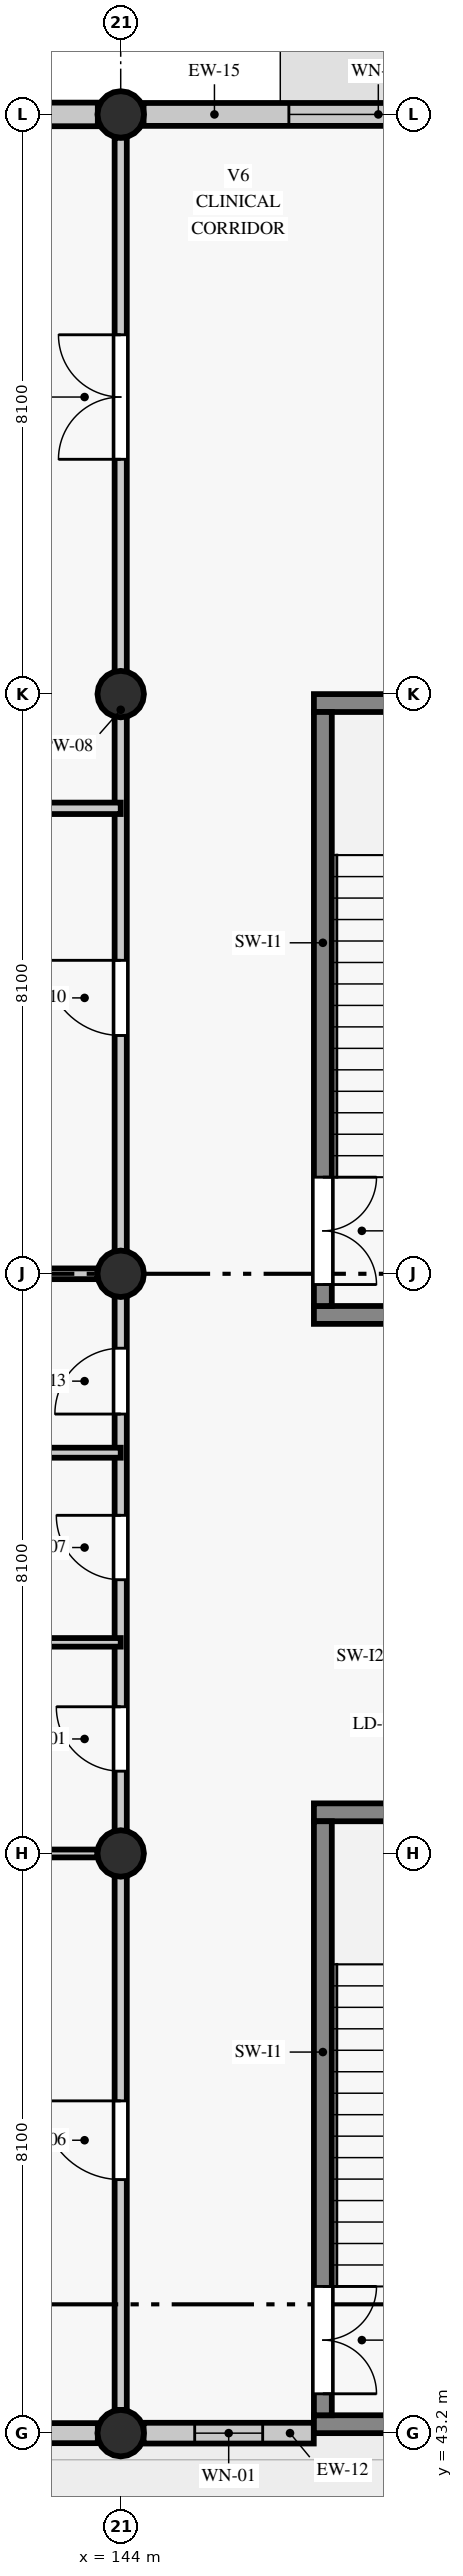
"""IFC4 building model, lengths in metres.
Left out: names, types, materials, properties, quantities, classifications, styles, units other than length and angle.
Written with IfcOpenShell. Run it as: python <this file> out.ifc"""

import sys

from ifc_helpers import new_model, si_unit, direction, frame, frame_2d, origin, origin_2d, place, context, subcontext, project, spatial, rectangle, circle, extrude, element, fill, save


model = new_model("IFC4")
c1 = context("Model", 3, precision=1e-05, world=origin(), true_north=direction((0.0, 1.0)))
c2 = subcontext(c1, "Body", "Model", "MODEL_VIEW")
j1 = project(units=[si_unit("LENGTHUNIT", "METRE"), si_unit("PLANEANGLEUNIT", "RADIAN")], contexts=[c1])
p1 = place(None, origin())
s1 = spatial("IfcSite", under=j1, at=p1, CompositionType="ELEMENT")
p2 = place(p1, origin())
s2 = spatial("IfcBuilding", under=s1, at=p2, CompositionType="ELEMENT")
p3 = place(p2, frame((0.0, 0.0, 4.8)))
s3 = spatial("IfcBuildingStorey", under=s2, at=p3, CompositionType="ELEMENT", Elevation=4.8)
for number, where, z_axis, x_axis in (
    (1, (144.0, 43.2, 0.0), (0.0, 0.0, 1.0), (1.0, 0.0, 0.0)),
    (2, (144.0, 51.3, 0.0), (0.0, 0.0, 1.0), (1.0, 0.0, 0.0)),
    (3, (144.0, 59.4, 0.0), (0.0, 0.0, 1.0), (1.0, 0.0, 0.0)),
):
    element("IfcColumn", number, at=place(p3, frame(where, z_axis=z_axis, x_axis=x_axis)), inside=s3, PredefinedType="COLUMN", context=c2, shape_type="SweptSolid", body=[
        extrude(circle(Radius=0.325, at=origin_2d()), origin(), (0.0, 0.0, 1.0), 4.56),
    ])
for number, where, z_axis, x_axis in (
    (4, (144.0, 67.5, 0.0), (0.0, 0.0, 1.0), (1.0, 0.0, 0.0)),
    (5, (144.0, 75.6, 0.0), (0.0, 0.0, 1.0), (1.0, 0.0, 0.0)),
):
    element("IfcColumn", number, at=place(p3, frame(where, z_axis=z_axis, x_axis=x_axis)), inside=s3, PredefinedType="COLUMN", context=c2, shape_type="SweptSolid", body=[
        extrude(circle(Radius=0.325, at=origin_2d()), origin(), (0.0, 0.0, 1.0), 4.518),
    ])
p4 = place(p3, frame((137.12, 43.2, 0.0), z_axis=(0.0, 0.0, 1.0), x_axis=(1.0, 0.0, 0.0)))
e6 = element("IfcWall", 6, at=p4, inside=s3, PredefinedType="STANDARD", context=c2, shape_type="SweptSolid", body=[
    extrude(rectangle(XDim=6.56, YDim=0.28, at=frame_2d((3.28, 0.0))), origin(), (0.0, 0.0, 1.0), 3.91),
])
p5 = place(p4, frame((2.76, 0.0, 0.0)))
e7 = element("IfcOpeningElement", 7, at=p5, cuts=e6, PredefinedType="OPENING", context=c2, shape_type="SweptSolid", body=[
    extrude(rectangle(XDim=1.04, YDim=2.1, at=frame_2d((0.52, 1.05))), frame((0.0, 0.15, 0.0), z_axis=(0.0, -1.0, 0.0), x_axis=(1.0, 0.0, 0.0)), (0.0, 0.0, 1.0), 0.3),
])
p6 = place(p3, frame((144.32, 43.2, 0.0), z_axis=(0.0, 0.0, 1.0), x_axis=(1.0, 0.0, 0.0)))
e8 = element("IfcWall", 8, at=p6, inside=s3, PredefinedType="STANDARD", context=c2, shape_type="SweptSolid", body=[
    extrude(rectangle(XDim=2.378, YDim=0.29, at=frame_2d((1.189, 0.0))), origin(), (0.0, 0.0, 1.0), 4.56),
])
p7 = place(p6, frame((0.714, 0.0, 0.9)))
e9 = element("IfcOpeningElement", 9, at=p7, cuts=e8, PredefinedType="OPENING", context=c2, shape_type="SweptSolid", body=[
    extrude(rectangle(XDim=0.95, YDim=1.3, at=frame_2d((0.475, 0.65))), frame((0.0, 0.155, 0.0), z_axis=(0.0, -1.0, 0.0), x_axis=(1.0, 0.0, 0.0)), (0.0, 0.0, 1.0), 0.31),
])
p8 = place(p3, frame((150.88, 75.6, 0.0), z_axis=(0.0, 0.0, 1.0), x_axis=(-1.0, 0.0, 0.0)))
e10 = element("IfcWall", 10, at=p8, inside=s3, PredefinedType="STANDARD", context=c2, shape_type="SweptSolid", body=[
    extrude(rectangle(XDim=6.56, YDim=0.32, at=frame_2d((3.28, 0.0))), origin(), (0.0, 0.0, 1.0), 3.868),
])
p9 = place(p8, frame((2.03, 0.0, 0.9)))
e11 = element("IfcOpeningElement", 11, at=p9, cuts=e10, PredefinedType="OPENING", context=c2, shape_type="SweptSolid", body=[
    extrude(rectangle(XDim=2.5, YDim=1.66, at=frame_2d((1.25, 0.83))), frame((0.0, 0.17, 0.0), z_axis=(0.0, -1.0, 0.0), x_axis=(1.0, 0.0, 0.0)), (0.0, 0.0, 1.0), 0.34),
])
p10 = place(p3, frame((143.68, 75.6, 0.0), z_axis=(0.0, 0.0, 1.0), x_axis=(-1.0, 0.0, 0.0)))
e12 = element("IfcWall", 12, at=p10, inside=s3, PredefinedType="STANDARD", context=c2, shape_type="SweptSolid", body=[
    extrude(rectangle(XDim=6.56, YDim=0.33, at=frame_2d((3.28, 0.0))), origin(), (0.0, 0.0, 1.0), 3.868),
])
p11 = place(p10, frame((2.605, 0.0, 0.9)))
e13 = element("IfcOpeningElement", 13, at=p11, cuts=e12, PredefinedType="OPENING", context=c2, shape_type="SweptSolid", body=[
    extrude(rectangle(XDim=1.35, YDim=1.78, at=frame_2d((0.675, 0.89))), frame((0.0, 0.175, 0.0), z_axis=(0.0, -1.0, 0.0), x_axis=(1.0, 0.0, 0.0)), (0.0, 0.0, 1.0), 0.35),
])
for number, where, z_axis, x_axis in (
    (14, (146.7, 43.325, 0.0), (0.0, 0.0, 1.0), (1.0, 0.0, 0.0)),
    (15, (151.2, 51.875, 0.0), (0.0, 0.0, 1.0), (-1.0, 0.0, 0.0)),
):
    element("IfcWall", number, at=place(p3, frame(where, z_axis=z_axis, x_axis=x_axis)), inside=s3, PredefinedType="SHEAR", context=c2, shape_type="SweptSolid", body=[
        extrude(rectangle(XDim=4.5, YDim=0.25, at=frame_2d((2.25, 0.0))), origin(), (0.0, 0.0, 1.0), 4.56),
    ])
p12 = place(p3, frame((146.825, 51.75, 0.0), z_axis=(0.0, 0.0, 1.0), x_axis=(0.0, -1.0, 0.0)))
e16 = element("IfcWall", 16, at=p12, inside=s3, PredefinedType="SHEAR", context=c2, shape_type="SweptSolid", body=[
    extrude(rectangle(XDim=8.3, YDim=0.25, at=frame_2d((4.15, 0.0))), origin(), (0.0, 0.0, 1.0), 4.56),
])
p13 = place(p12, frame((6.5, 0.0, 0.0)))
e17 = element("IfcOpeningElement", 17, at=p13, cuts=e16, PredefinedType="OPENING", context=c2, shape_type="SweptSolid", body=[
    extrude(rectangle(XDim=1.5, YDim=2.15, at=frame_2d((0.75, 1.075))), frame((0.0, 0.135, 0.0), z_axis=(0.0, -1.0, 0.0), x_axis=(1.0, 0.0, 0.0)), (0.0, 0.0, 1.0), 0.27),
])
for number, where, z_axis, x_axis in (
    (18, (146.7, 58.825, 0.0), (0.0, 0.0, 1.0), (1.0, 0.0, 0.0)),
    (19, (151.2, 67.375, 0.0), (0.0, 0.0, 1.0), (-1.0, 0.0, 0.0)),
):
    element("IfcWall", number, at=place(p3, frame(where, z_axis=z_axis, x_axis=x_axis)), inside=s3, PredefinedType="SHEAR", context=c2, shape_type="SweptSolid", body=[
        extrude(rectangle(XDim=4.5, YDim=0.25, at=frame_2d((2.25, 0.0))), origin(), (0.0, 0.0, 1.0), 4.56),
    ])
p14 = place(p3, frame((146.825, 67.25, 0.0), z_axis=(0.0, 0.0, 1.0), x_axis=(0.0, -1.0, 0.0)))
e20 = element("IfcWall", 20, at=p14, inside=s3, PredefinedType="SHEAR", context=c2, shape_type="SweptSolid", body=[
    extrude(rectangle(XDim=8.3, YDim=0.25, at=frame_2d((4.15, 0.0))), origin(), (0.0, 0.0, 1.0), 4.56),
])
p15 = place(p14, frame((6.5, 0.0, 0.0)))
e21 = element("IfcOpeningElement", 21, at=p15, cuts=e20, PredefinedType="OPENING", context=c2, shape_type="SweptSolid", body=[
    extrude(rectangle(XDim=1.5, YDim=2.15, at=frame_2d((0.75, 1.075))), frame((0.0, 0.135, 0.0), z_axis=(0.0, -1.0, 0.0), x_axis=(1.0, 0.0, 0.0)), (0.0, 0.0, 1.0), 0.27),
])
p16 = place(p3, frame((144.0, 43.525, 0.0), z_axis=(0.0, 0.0, 1.0), x_axis=(0.0, 1.0, 0.0)))
e22 = element("IfcWall", 22, at=p16, inside=s3, PredefinedType="PARTITIONING", context=c2, shape_type="SweptSolid", body=[
    extrude(rectangle(XDim=31.75, YDim=0.17, at=frame_2d((15.875, 0.0))), origin(), (0.0, 0.0, 1.0), 4.068),
])
p17 = place(p16, frame((3.218, 0.0, 0.0)))
e23 = element("IfcOpeningElement", 23, at=p17, cuts=e22, PredefinedType="OPENING", context=c2, shape_type="SweptSolid", body=[
    extrude(rectangle(XDim=1.1, YDim=2.08, at=frame_2d((0.55, 1.04))), frame((0.0, 0.095, 0.0), z_axis=(0.0, -1.0, 0.0), x_axis=(1.0, 0.0, 0.0)), (0.0, 0.0, 1.0), 0.19),
])
p18 = place(p16, frame((8.925, 0.0, 0.0)))
e24 = element("IfcOpeningElement", 24, at=p18, cuts=e22, PredefinedType="OPENING", context=c2, shape_type="SweptSolid", body=[
    extrude(rectangle(XDim=0.9, YDim=2.08, at=frame_2d((0.45, 1.04))), frame((0.0, 0.095, 0.0), z_axis=(0.0, -1.0, 0.0), x_axis=(1.0, 0.0, 0.0)), (0.0, 0.0, 1.0), 0.19),
])
p19 = place(p16, frame((11.6, 0.0, 0.0)))
e25 = element("IfcOpeningElement", 25, at=p19, cuts=e22, PredefinedType="OPENING", context=c2, shape_type="SweptSolid", body=[
    extrude(rectangle(XDim=0.9, YDim=2.13, at=frame_2d((0.45, 1.065))), frame((0.0, 0.095, 0.0), z_axis=(0.0, -1.0, 0.0), x_axis=(1.0, 0.0, 0.0)), (0.0, 0.0, 1.0), 0.19),
])
p20 = place(p16, frame((13.915, 0.0, 0.0)))
e26 = element("IfcOpeningElement", 26, at=p20, cuts=e22, PredefinedType="OPENING", context=c2, shape_type="SweptSolid", body=[
    extrude(rectangle(XDim=0.92, YDim=2.18, at=frame_2d((0.46, 1.09))), frame((0.0, 0.095, 0.0), z_axis=(0.0, -1.0, 0.0), x_axis=(1.0, 0.0, 0.0)), (0.0, 0.0, 1.0), 0.19),
])
p21 = place(p16, frame((19.205, 0.0, 0.0)))
e27 = element("IfcOpeningElement", 27, at=p21, cuts=e22, PredefinedType="OPENING", context=c2, shape_type="SweptSolid", body=[
    extrude(rectangle(XDim=1.05, YDim=2.13, at=frame_2d((0.525, 1.065))), frame((0.0, 0.095, 0.0), z_axis=(0.0, -1.0, 0.0), x_axis=(1.0, 0.0, 0.0)), (0.0, 0.0, 1.0), 0.19),
])
p22 = place(p16, frame((27.256, 0.0, 0.0)))
e28 = element("IfcOpeningElement", 28, at=p22, cuts=e22, PredefinedType="OPENING", context=c2, shape_type="SweptSolid", body=[
    extrude(rectangle(XDim=1.74, YDim=2.26, at=frame_2d((0.87, 1.13))), frame((0.0, 0.095, 0.0), z_axis=(0.0, -1.0, 0.0), x_axis=(1.0, 0.0, 0.0)), (0.0, 0.0, 1.0), 0.19),
])
p23 = place(p3, frame((137.125, 51.3, 0.0), z_axis=(0.0, 0.0, 1.0), x_axis=(1.0, 0.0, 0.0)))
e29 = element("IfcWall", 29, at=p23, inside=s3, PredefinedType="PARTITIONING", context=c2, shape_type="SweptSolid", body=[
    extrude(rectangle(XDim=6.55, YDim=0.11, at=frame_2d((3.275, 0.0))), origin(), (0.0, 0.0, 1.0), 3.86),
])
p24 = place(p3, frame((140.65, 54.25, 0.0), z_axis=(0.0, 0.0, 1.0), x_axis=(1.0, 0.0, 0.0)))
e30 = element("IfcWall", 30, at=p24, inside=s3, PredefinedType="PARTITIONING", context=c2, shape_type="SweptSolid", body=[
    extrude(rectangle(XDim=3.35, YDim=0.12, at=frame_2d((1.675, 0.0))), origin(), (0.0, 0.0, 1.0), 4.56),
])
p25 = place(p3, frame((136.922, 56.9, 0.0), z_axis=(0.0, 0.0, 1.0), x_axis=(1.0, 0.0, 0.0)))
e31 = element("IfcWall", 31, at=p25, inside=s3, PredefinedType="PARTITIONING", context=c2, shape_type="SweptSolid", body=[
    extrude(rectangle(XDim=7.078, YDim=0.14, at=frame_2d((3.539, 0.0))), origin(), (0.0, 0.0, 1.0), 4.56),
])
p26 = place(p3, frame((137.125, 59.4, 0.0), z_axis=(0.0, 0.0, 1.0), x_axis=(1.0, 0.0, 0.0)))
e32 = element("IfcWall", 32, at=p26, inside=s3, PredefinedType="PARTITIONING", context=c2, shape_type="SweptSolid", body=[
    extrude(rectangle(XDim=6.55, YDim=0.15, at=frame_2d((3.275, 0.0))), origin(), (0.0, 0.0, 1.0), 3.86),
])
p27 = place(p3, frame((136.917, 65.904, 0.0), z_axis=(0.0, 0.0, 1.0), x_axis=(1.0, 0.0, 0.0)))
e33 = element("IfcWall", 33, at=p27, inside=s3, PredefinedType="PARTITIONING", context=c2, shape_type="SweptSolid", body=[
    extrude(rectangle(XDim=7.083, YDim=0.16, at=frame_2d((3.542, 0.0))), origin(), (0.0, 0.0, 1.0), 4.11),
])
p28 = place(p7, origin())
e34 = element("IfcWindow", 34, at=p28, inside=s3, PartitioningType="SINGLE_PANEL", PredefinedType="WINDOW", context=c2, shape_type="SweptSolid", body=[
    extrude(rectangle(XDim=0.95, YDim=1.3, at=frame_2d((0.475, 0.65))), frame((0.0, 0.03, 0.0), z_axis=(0.0, -1.0, 0.0), x_axis=(1.0, 0.0, 0.0)), (0.0, 0.0, 1.0), 0.06),
])
fill(e9, e34)
p29 = place(p9, origin())
e35 = element("IfcWindow", 35, at=p29, inside=s3, PartitioningType="SINGLE_PANEL", PredefinedType="WINDOW", context=c2, shape_type="SweptSolid", body=[
    extrude(rectangle(XDim=2.5, YDim=1.66, at=frame_2d((1.25, 0.83))), frame((0.0, 0.03, 0.0), z_axis=(0.0, -1.0, 0.0), x_axis=(1.0, 0.0, 0.0)), (0.0, 0.0, 1.0), 0.06),
])
fill(e11, e35)
p30 = place(p13, origin())
e36 = element("IfcDoor", 36, at=p30, inside=s3, OperationType="DOUBLE_DOOR_SINGLE_SWING", PredefinedType="DOOR", context=c2, shape_type="SweptSolid", body=[
    extrude(rectangle(XDim=1.5, YDim=2.15, at=frame_2d((0.75, 1.075))), frame((0.0, 0.025, 0.0), z_axis=(0.0, -1.0, 0.0), x_axis=(1.0, 0.0, 0.0)), (0.0, 0.0, 1.0), 0.05),
])
fill(e17, e36)
p31 = place(p15, origin())
e37 = element("IfcDoor", 37, at=p31, inside=s3, OperationType="DOUBLE_DOOR_SINGLE_SWING", PredefinedType="DOOR", context=c2, shape_type="SweptSolid", body=[
    extrude(rectangle(XDim=1.5, YDim=2.15, at=frame_2d((0.75, 1.075))), frame((0.0, 0.025, 0.0), z_axis=(0.0, -1.0, 0.0), x_axis=(1.0, 0.0, 0.0)), (0.0, 0.0, 1.0), 0.05),
])
fill(e21, e37)
p32 = place(p17, origin())
e38 = element("IfcDoor", 38, at=p32, inside=s3, OperationType="SINGLE_SWING_RIGHT", PredefinedType="DOOR", context=c2, shape_type="SweptSolid", body=[
    extrude(rectangle(XDim=1.1, YDim=2.08, at=frame_2d((0.55, 1.04))), frame((0.0, 0.025, 0.0), z_axis=(0.0, -1.0, 0.0), x_axis=(1.0, 0.0, 0.0)), (0.0, 0.0, 1.0), 0.05),
])
fill(e23, e38)
p33 = place(p18, origin())
e39 = element("IfcDoor", 39, at=p33, inside=s3, OperationType="SINGLE_SWING_RIGHT", PredefinedType="DOOR", context=c2, shape_type="SweptSolid", body=[
    extrude(rectangle(XDim=0.9, YDim=2.08, at=frame_2d((0.45, 1.04))), frame((0.0, 0.025, 0.0), z_axis=(0.0, -1.0, 0.0), x_axis=(1.0, 0.0, 0.0)), (0.0, 0.0, 1.0), 0.05),
])
fill(e24, e39)
p34 = place(p19, origin())
e40 = element("IfcDoor", 40, at=p34, inside=s3, OperationType="SINGLE_SWING_RIGHT", PredefinedType="DOOR", context=c2, shape_type="SweptSolid", body=[
    extrude(rectangle(XDim=0.9, YDim=2.13, at=frame_2d((0.45, 1.065))), frame((0.0, 0.025, 0.0), z_axis=(0.0, -1.0, 0.0), x_axis=(1.0, 0.0, 0.0)), (0.0, 0.0, 1.0), 0.05),
])
fill(e25, e40)
p35 = place(p20, origin())
e41 = element("IfcDoor", 41, at=p35, inside=s3, OperationType="SINGLE_SWING_LEFT", PredefinedType="DOOR", context=c2, shape_type="SweptSolid", body=[
    extrude(rectangle(XDim=0.92, YDim=2.18, at=frame_2d((0.46, 1.09))), frame((0.0, 0.025, 0.0), z_axis=(0.0, -1.0, 0.0), x_axis=(1.0, 0.0, 0.0)), (0.0, 0.0, 1.0), 0.05),
])
fill(e26, e41)
p36 = place(p21, origin())
e42 = element("IfcDoor", 42, at=p36, inside=s3, OperationType="SINGLE_SWING_RIGHT", PredefinedType="DOOR", context=c2, shape_type="SweptSolid", body=[
    extrude(rectangle(XDim=1.05, YDim=2.13, at=frame_2d((0.525, 1.065))), frame((0.0, 0.025, 0.0), z_axis=(0.0, -1.0, 0.0), x_axis=(1.0, 0.0, 0.0)), (0.0, 0.0, 1.0), 0.05),
])
fill(e27, e42)
p37 = place(p22, origin())
e43 = element("IfcDoor", 43, at=p37, inside=s3, OperationType="DOUBLE_DOOR_SINGLE_SWING", PredefinedType="DOOR", context=c2, shape_type="SweptSolid", body=[
    extrude(rectangle(XDim=1.74, YDim=2.26, at=frame_2d((0.87, 1.13))), frame((0.0, 0.025, 0.0), z_axis=(0.0, -1.0, 0.0), x_axis=(1.0, 0.0, 0.0)), (0.0, 0.0, 1.0), 0.05),
])
fill(e28, e43)
save(model, sys.argv[1])
